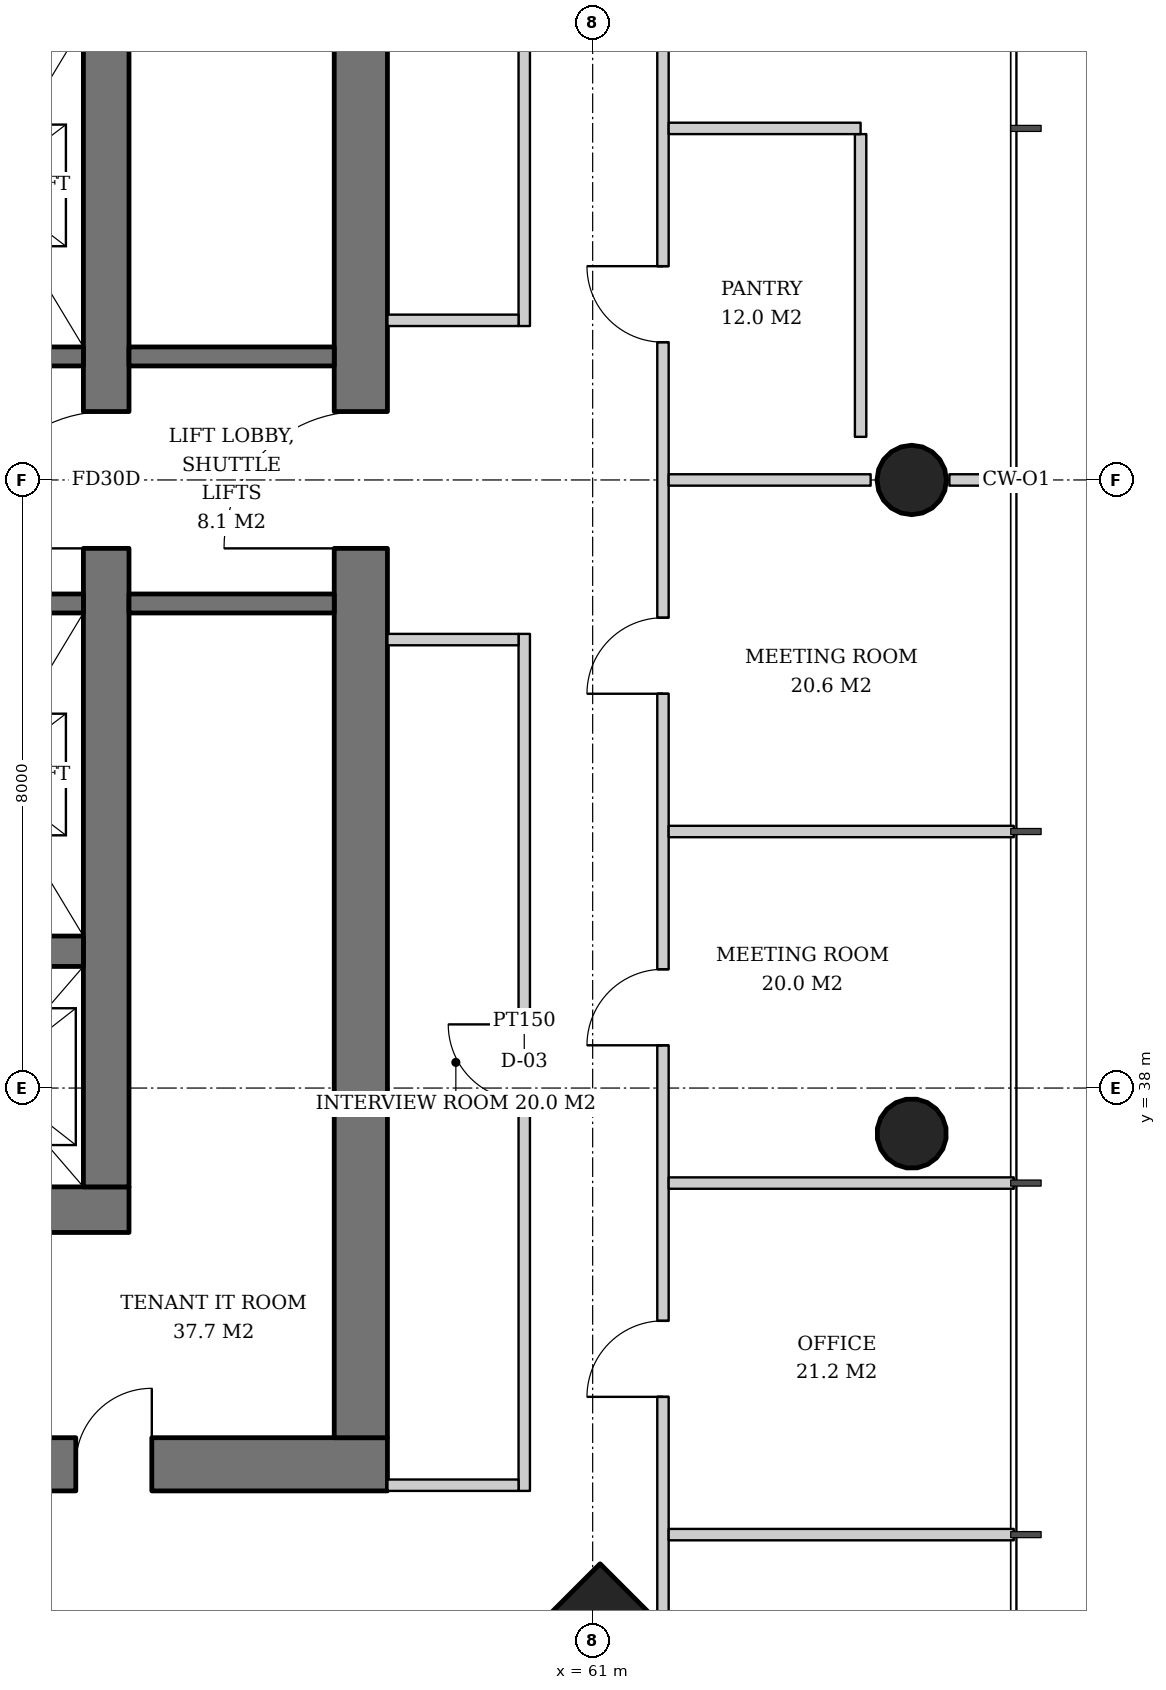
"""IFC4 building model, lengths in metres.
Left out: names, types, materials, properties, quantities, classifications, styles, units other than length and angle.
Written with IfcOpenShell. Run it as: python <this file> out.ifc"""

import sys

from ifc_helpers import new_model, si_unit, direction, frame, frame_2d, origin, origin_2d, place, context, subcontext, project, spatial, rectangle, hollow_circle, extrude, element, fill, save


model = new_model("IFC4")
c1 = context("Model", 3, precision=1e-05, world=origin(), true_north=direction((0.0, 1.0)))
c2 = subcontext(c1, "Body", "Model", "MODEL_VIEW")
j1 = project(units=[si_unit("LENGTHUNIT", "METRE"), si_unit("PLANEANGLEUNIT", "RADIAN")], contexts=[c1])
p1 = place(None, origin())
s1 = spatial("IfcSite", under=j1, at=p1, CompositionType="ELEMENT")
p2 = place(p1, origin())
s2 = spatial("IfcBuilding", under=s1, at=p2, CompositionType="ELEMENT")
p3 = place(p2, frame((0.0, 0.0, 138.8)))
s3 = spatial("IfcBuildingStorey", under=s2, at=p3, CompositionType="ELEMENT", Elevation=138.8)
p4 = place(p3, frame((65.236, 37.382, 0.0), z_axis=(-0.031910269556, 0.015987237665, 0.999362868496), x_axis=(-0.447933021895, -0.894067115991, 0.0)))
e1 = element("IfcColumn", 1, at=p4, inside=s3, PredefinedType="COLUMN", context=c2, shape_type="SweptSolid", body=[
    extrude(hollow_circle(Radius=0.457, WallThickness=0.03, at=origin_2d()), origin(), (0.0, 0.0, 1.0), 3.802),
])
p5 = place(p3, frame((65.236, 46.0, 0.0), z_axis=(-0.031914348339, 0.0, 0.999490607445), x_axis=(0.0, -1.0, 0.0)))
e2 = element("IfcColumn", 2, at=p5, inside=s3, PredefinedType="COLUMN", context=c2, shape_type="SweptSolid", body=[
    extrude(hollow_circle(Radius=0.457, WallThickness=0.03, at=origin_2d()), origin(), (0.0, 0.0, 1.0), 3.802),
])
p6 = place(p3, frame((61.136, 29.864, 0.0), z_axis=(-0.031898107953, 0.031898107953, 0.998981992539), x_axis=(-0.707106781187, -0.707106781187, 0.0)))
e3 = element("IfcColumn", 3, at=p6, inside=s3, PredefinedType="COLUMN", context=c2, shape_type="SweptSolid", body=[
    extrude(rectangle(XDim=2.6, YDim=2.6, at=origin_2d()), origin(), (0.0, 0.0, 1.0), 3.804),
])
p7 = place(p3, frame((35.1, 36.4, 0.0), z_axis=(0.0, 0.0, 1.0), x_axis=(1.0, 0.0, 0.0)))
e4 = element("IfcWall", 4, at=p7, inside=s3, PredefinedType="SHEAR", context=c2, shape_type="SweptSolid", body=[
    extrude(rectangle(XDim=19.8, YDim=0.6, at=frame_2d((9.9, 0.0))), origin(), (0.0, 0.0, 1.0), 3.8),
])
p8 = place(p7, frame((3.9, 0.0, 0.0)))
e5 = element("IfcOpeningElement", 5, at=p8, cuts=e4, PredefinedType="OPENING", context=c2, shape_type="SweptSolid", body=[
    extrude(rectangle(XDim=1.0, YDim=2.1, at=frame_2d((0.5, 1.05))), frame((0.0, 0.31, 0.0), z_axis=(0.0, -1.0, 0.0), x_axis=(1.0, 0.0, 0.0)), (0.0, 0.0, 1.0), 0.62),
])
p9 = place(p7, frame((15.35, 0.0, 0.0)))
e6 = element("IfcOpeningElement", 6, at=p9, cuts=e4, PredefinedType="OPENING", context=c2, shape_type="SweptSolid", body=[
    extrude(rectangle(XDim=1.0, YDim=2.1, at=frame_2d((0.5, 1.05))), frame((0.0, 0.31, 0.0), z_axis=(0.0, -1.0, 0.0), x_axis=(1.0, 0.0, 0.0)), (0.0, 0.0, 1.0), 0.62),
])
p10 = place(p3, frame((54.6, 36.7, 0.0), z_axis=(0.0, 0.0, 1.0), x_axis=(0.0, 1.0, 0.0)))
e7 = element("IfcWall", 7, at=p10, inside=s3, PredefinedType="SHEAR", context=c2, shape_type="SweptSolid", body=[
    extrude(rectangle(XDim=18.6, YDim=0.6, at=frame_2d((9.3, 0.0))), origin(), (0.0, 0.0, 1.0), 3.8),
])
p11 = place(p10, frame((8.4, 0.0, 0.0)))
e8 = element("IfcOpeningElement", 8, at=p11, cuts=e7, PredefinedType="OPENING", context=c2, shape_type="SweptSolid", body=[
    extrude(rectangle(XDim=1.8, YDim=2.4, at=frame_2d((0.9, 1.2))), frame((0.0, 0.31, 0.0), z_axis=(0.0, -1.0, 0.0), x_axis=(1.0, 0.0, 0.0)), (0.0, 0.0, 1.0), 0.62),
])
p12 = place(p3, frame((31.7, 33.05, 0.0), z_axis=(0.0, 0.0, 1.0), x_axis=(1.0, 0.0, 0.0)))
e9 = element("IfcWall", 9, at=p12, inside=s3, PredefinedType="SHEAR", context=c2, shape_type="SweptSolid", body=[
    extrude(rectangle(XDim=26.6, YDim=0.7, at=frame_2d((13.3, 0.0))), origin(), (0.0, 0.0, 1.0), 3.8),
])
p13 = place(p12, frame((7.3, 0.0, 0.0)))
e10 = element("IfcOpeningElement", 10, at=p13, cuts=e9, PredefinedType="OPENING", context=c2, shape_type="SweptSolid", body=[
    extrude(rectangle(XDim=1.0, YDim=2.1, at=frame_2d((0.5, 1.05))), frame((0.0, 0.36, 0.0), z_axis=(0.0, -1.0, 0.0), x_axis=(1.0, 0.0, 0.0)), (0.0, 0.0, 1.0), 0.72),
])
p14 = place(p12, frame((18.75, 0.0, 0.0)))
e11 = element("IfcOpeningElement", 11, at=p14, cuts=e9, PredefinedType="OPENING", context=c2, shape_type="SweptSolid", body=[
    extrude(rectangle(XDim=1.0, YDim=2.1, at=frame_2d((0.5, 1.05))), frame((0.0, 0.36, 0.0), z_axis=(0.0, -1.0, 0.0), x_axis=(1.0, 0.0, 0.0)), (0.0, 0.0, 1.0), 0.72),
])
p15 = place(p12, frame((3.2, 0.0, 0.0)))
e12 = element("IfcOpeningElement", 12, at=p15, cuts=e9, PredefinedType="OPENING", context=c2, shape_type="SweptSolid", body=[
    extrude(rectangle(XDim=1.0, YDim=2.1, at=frame_2d((0.5, 1.05))), frame((0.0, 0.36, 0.0), z_axis=(0.0, -1.0, 0.0), x_axis=(1.0, 0.0, 0.0)), (0.0, 0.0, 1.0), 0.72),
])
p16 = place(p12, frame((10.42, 0.0, 0.0)))
e13 = element("IfcOpeningElement", 13, at=p16, cuts=e9, PredefinedType="OPENING", context=c2, shape_type="SweptSolid", body=[
    extrude(rectangle(XDim=1.0, YDim=2.1, at=frame_2d((0.5, 1.05))), frame((0.0, 0.36, 0.0), z_axis=(0.0, -1.0, 0.0), x_axis=(1.0, 0.0, 0.0)), (0.0, 0.0, 1.0), 0.72),
])
p17 = place(p12, frame((14.46, 0.0, 0.0)))
e14 = element("IfcOpeningElement", 14, at=p17, cuts=e9, PredefinedType="OPENING", context=c2, shape_type="SweptSolid", body=[
    extrude(rectangle(XDim=1.0, YDim=2.1, at=frame_2d((0.5, 1.05))), frame((0.0, 0.36, 0.0), z_axis=(0.0, -1.0, 0.0), x_axis=(1.0, 0.0, 0.0)), (0.0, 0.0, 1.0), 0.72),
])
p18 = place(p12, frame((22.5, 0.0, 0.0)))
e15 = element("IfcOpeningElement", 15, at=p18, cuts=e9, PredefinedType="OPENING", context=c2, shape_type="SweptSolid", body=[
    extrude(rectangle(XDim=1.0, YDim=2.1, at=frame_2d((0.5, 1.05))), frame((0.0, 0.36, 0.0), z_axis=(0.0, -1.0, 0.0), x_axis=(1.0, 0.0, 0.0)), (0.0, 0.0, 1.0), 0.72),
])
p19 = place(p3, frame((57.95, 33.4, 0.0), z_axis=(0.0, 0.0, 1.0), x_axis=(0.0, 1.0, 0.0)))
e16 = element("IfcWall", 16, at=p19, inside=s3, PredefinedType="SHEAR", context=c2, shape_type="SweptSolid", body=[
    extrude(rectangle(XDim=25.2, YDim=0.7, at=frame_2d((12.6, 0.0))), origin(), (0.0, 0.0, 1.0), 3.8),
])
p20 = place(p19, frame((11.7, 0.0, 0.0)))
e17 = element("IfcOpeningElement", 17, at=p20, cuts=e16, PredefinedType="OPENING", context=c2, shape_type="SweptSolid", body=[
    extrude(rectangle(XDim=1.8, YDim=2.4, at=frame_2d((0.9, 1.2))), frame((0.0, 0.36, 0.0), z_axis=(0.0, -1.0, 0.0), x_axis=(1.0, 0.0, 0.0)), (0.0, 0.0, 1.0), 0.72),
])
p21 = place(p3, frame((35.7, 39.8, 0.0), z_axis=(0.0, 0.0, 1.0), x_axis=(1.0, 0.0, 0.0)))
e18 = element("IfcWall", 18, at=p21, inside=s3, PredefinedType="SHEAR", context=c2, shape_type="SweptSolid", body=[
    extrude(rectangle(XDim=18.6, YDim=0.4, at=frame_2d((9.3, 0.0))), origin(), (0.0, 0.0, 1.0), 3.8),
])
for number, where, z_axis, x_axis in (
    (19, (48.93, 47.625, 0.0), (0.0, 0.0, 1.0), (1.0, 0.0, 0.0)),
    (20, (48.93, 44.375, 0.0), (0.0, 0.0, 1.0), (1.0, 0.0, 0.0)),
):
    element("IfcWall", number, at=place(p3, frame(where, z_axis=z_axis, x_axis=x_axis)), inside=s3, PredefinedType="SHEAR", context=c2, shape_type="SweptSolid", body=[
        extrude(rectangle(XDim=5.37, YDim=0.25, at=frame_2d((2.685, 0.0))), origin(), (0.0, 0.0, 1.0), 3.8),
    ])
for number, where, z_axis, x_axis in (
    (21, (54.9, 44.375, 0.0), (0.0, 0.0, 1.0), (1.0, 0.0, 0.0)),
    (22, (54.9, 47.625, 0.0), (0.0, 0.0, 1.0), (1.0, 0.0, 0.0)),
):
    element("IfcWall", number, at=place(p3, frame(where, z_axis=z_axis, x_axis=x_axis)), inside=s3, PredefinedType="SOLIDWALL", context=c2, shape_type="SweptSolid", body=[
        extrude(rectangle(XDim=2.7, YDim=0.25, at=frame_2d((1.35, 0.0))), origin(), (0.0, 0.0, 1.0), 3.62),
    ])
p22 = place(p3, frame((60.1, 32.7, 0.0), z_axis=(0.0, 0.0, 1.0), x_axis=(0.0, 1.0, 0.0)))
e23 = element("IfcWall", 23, at=p22, inside=s3, PredefinedType="PARTITIONING", context=c2, shape_type="SweptSolid", body=[
    extrude(rectangle(XDim=11.275, YDim=0.15, at=frame_2d((5.638, 0.0))), origin(), (0.0, 0.0, 1.0), 2.72),
])
p23 = place(p22, frame((5.137, 0.0, 0.0)))
e24 = element("IfcOpeningElement", 24, at=p23, cuts=e23, PredefinedType="OPENING", context=c2, shape_type="SweptSolid", body=[
    extrude(rectangle(XDim=1.0, YDim=2.1, at=frame_2d((0.5, 1.05))), frame((0.0, 0.085, 0.0), z_axis=(0.0, -1.0, 0.0), x_axis=(1.0, 0.0, 0.0)), (0.0, 0.0, 1.0), 0.17),
])
for number, where, z_axis, x_axis in (
    (25, (58.3, 32.775, 0.0), (0.0, 0.0, 1.0), (1.0, 0.0, 0.0)),
    (26, (58.3, 43.9, 0.0), (0.0, 0.0, 1.0), (1.0, 0.0, 0.0)),
):
    element("IfcWall", number, at=place(p3, frame(where, z_axis=z_axis, x_axis=x_axis)), inside=s3, PredefinedType="PARTITIONING", context=c2, shape_type="SweptSolid", body=[
        extrude(rectangle(XDim=1.725, YDim=0.15, at=frame_2d((0.862, 0.0))), origin(), (0.0, 0.0, 1.0), 3.62),
    ])
p24 = place(p3, frame((60.1, 48.025, 0.0), z_axis=(0.0, 0.0, 1.0), x_axis=(0.0, 1.0, 0.0)))
e27 = element("IfcWall", 27, at=p24, inside=s3, PredefinedType="PARTITIONING", context=c2, shape_type="SweptSolid", body=[
    extrude(rectangle(XDim=11.275, YDim=0.15, at=frame_2d((5.638, 0.0))), origin(), (0.0, 0.0, 1.0), 2.806),
])
p25 = place(p24, frame((5.137, 0.0, 0.0)))
e28 = element("IfcOpeningElement", 28, at=p25, cuts=e27, PredefinedType="OPENING", context=c2, shape_type="SweptSolid", body=[
    extrude(rectangle(XDim=1.0, YDim=2.1, at=frame_2d((0.5, 1.05))), frame((0.0, 0.085, 0.0), z_axis=(0.0, -1.0, 0.0), x_axis=(1.0, 0.0, 0.0)), (0.0, 0.0, 1.0), 0.17),
])
p26 = place(p3, frame((58.3, 48.1, 0.0), z_axis=(0.0, 0.0, 1.0), x_axis=(1.0, 0.0, 0.0)))
e29 = element("IfcWall", 29, at=p26, inside=s3, PredefinedType="PARTITIONING", context=c2, shape_type="SweptSolid", body=[
    extrude(rectangle(XDim=1.725, YDim=0.15, at=frame_2d((0.862, 0.0))), origin(), (0.0, 0.0, 1.0), 3.62),
])
p27 = place(p3, frame((64.525, 46.567, 0.0), z_axis=(0.0, 0.0, 1.0), x_axis=(0.0, 1.0, 0.0)))
e30 = element("IfcWall", 30, at=p27, inside=s3, PredefinedType="PARTITIONING", context=c2, shape_type="SweptSolid", body=[
    extrude(rectangle(XDim=3.983, YDim=0.15, at=frame_2d((1.991, 0.0))), origin(), (0.0, 0.0, 1.0), 2.858),
])
p28 = place(p3, frame((61.925, 30.989, 0.0), z_axis=(0.0, 0.0, 1.0), x_axis=(0.0, 1.0, 0.0)))
e31 = element("IfcWall", 31, at=p28, inside=s3, PredefinedType="PARTITIONING", context=c2, shape_type="SweptSolid", body=[
    extrude(rectangle(XDim=30.023, YDim=0.15, at=frame_2d((15.011, 0.0))), origin(), (0.0, 0.0, 1.0), 2.72),
])
p29 = place(p28, frame((2.949, 0.0, 0.0)))
e32 = element("IfcOpeningElement", 32, at=p29, cuts=e31, PredefinedType="OPENING", context=c2, shape_type="SweptSolid", body=[
    extrude(rectangle(XDim=1.0, YDim=2.1, at=frame_2d((0.5, 1.05))), frame((0.0, 0.085, 0.0), z_axis=(0.0, -1.0, 0.0), x_axis=(1.0, 0.0, 0.0)), (0.0, 0.0, 1.0), 0.17),
])
p30 = place(p28, frame((7.574, 0.0, 0.0)))
e33 = element("IfcOpeningElement", 33, at=p30, cuts=e31, PredefinedType="OPENING", context=c2, shape_type="SweptSolid", body=[
    extrude(rectangle(XDim=1.0, YDim=2.1, at=frame_2d((0.5, 1.05))), frame((0.0, 0.085, 0.0), z_axis=(0.0, -1.0, 0.0), x_axis=(1.0, 0.0, 0.0)), (0.0, 0.0, 1.0), 0.17),
])
p31 = place(p28, frame((12.199, 0.0, 0.0)))
e34 = element("IfcOpeningElement", 34, at=p31, cuts=e31, PredefinedType="OPENING", context=c2, shape_type="SweptSolid", body=[
    extrude(rectangle(XDim=1.0, YDim=2.1, at=frame_2d((0.5, 1.05))), frame((0.0, 0.085, 0.0), z_axis=(0.0, -1.0, 0.0), x_axis=(1.0, 0.0, 0.0)), (0.0, 0.0, 1.0), 0.17),
])
p32 = place(p28, frame((16.824, 0.0, 0.0)))
e35 = element("IfcOpeningElement", 35, at=p32, cuts=e31, PredefinedType="OPENING", context=c2, shape_type="SweptSolid", body=[
    extrude(rectangle(XDim=1.0, YDim=2.1, at=frame_2d((0.5, 1.05))), frame((0.0, 0.085, 0.0), z_axis=(0.0, -1.0, 0.0), x_axis=(1.0, 0.0, 0.0)), (0.0, 0.0, 1.0), 0.17),
])
p33 = place(p28, frame((21.449, 0.0, 0.0)))
e36 = element("IfcOpeningElement", 36, at=p33, cuts=e31, PredefinedType="OPENING", context=c2, shape_type="SweptSolid", body=[
    extrude(rectangle(XDim=1.0, YDim=2.1, at=frame_2d((0.5, 1.05))), frame((0.0, 0.085, 0.0), z_axis=(0.0, -1.0, 0.0), x_axis=(1.0, 0.0, 0.0)), (0.0, 0.0, 1.0), 0.17),
])
p34 = place(p28, frame((26.074, 0.0, 0.0)))
e37 = element("IfcOpeningElement", 37, at=p34, cuts=e31, PredefinedType="OPENING", context=c2, shape_type="SweptSolid", body=[
    extrude(rectangle(XDim=1.0, YDim=2.1, at=frame_2d((0.5, 1.05))), frame((0.0, 0.085, 0.0), z_axis=(0.0, -1.0, 0.0), x_axis=(1.0, 0.0, 0.0)), (0.0, 0.0, 1.0), 0.17),
])
for number, where, z_axis, x_axis in (
    (38, (62.0, 32.125, 0.0), (0.0, 0.0, 1.0), (1.0, 0.0, 0.0)),
    (39, (62.0, 36.75, 0.0), (0.0, 0.0, 1.0), (1.0, 0.0, 0.0)),
    (40, (62.0, 41.375, 0.0), (0.0, 0.0, 1.0), (1.0, 0.0, 0.0)),
):
    element("IfcWall", number, at=place(p3, frame(where, z_axis=z_axis, x_axis=x_axis)), inside=s3, PredefinedType="PARTITIONING", context=c2, shape_type="SweptSolid", body=[
        extrude(rectangle(XDim=4.54, YDim=0.15, at=frame_2d((2.27, 0.0))), origin(), (0.0, 0.0, 1.0), 2.82),
    ])
p35 = place(p3, frame((62.0, 46.0, 0.0), z_axis=(0.0, 0.0, 1.0), x_axis=(1.0, 0.0, 0.0)))
e41 = element("IfcWall", 41, at=p35, inside=s3, PredefinedType="PARTITIONING", context=c2, shape_type="SweptSolid", body=[
    extrude(rectangle(XDim=2.657, YDim=0.15, at=frame_2d((1.329, 0.0))), origin(), (0.0, 0.0, 1.0), 3.62),
])
p36 = place(p3, frame((65.693, 46.0, 0.0), z_axis=(0.0, 0.0, 1.0), x_axis=(1.0, 0.0, 0.0)))
e42 = element("IfcWall", 42, at=p36, inside=s3, PredefinedType="PARTITIONING", context=c2, shape_type="SweptSolid", body=[
    extrude(rectangle(XDim=0.847, YDim=0.15, at=frame_2d((0.424, 0.0))), origin(), (0.0, 0.0, 1.0), 3.62),
])
p37 = place(p3, frame((62.0, 50.625, 0.0), z_axis=(0.0, 0.0, 1.0), x_axis=(1.0, 0.0, 0.0)))
e43 = element("IfcWall", 43, at=p37, inside=s3, PredefinedType="PARTITIONING", context=c2, shape_type="SweptSolid", body=[
    extrude(rectangle(XDim=2.525, YDim=0.15, at=frame_2d((1.262, 0.0))), origin(), (0.0, 0.0, 1.0), 3.62),
])
p38 = place(p11, origin())
e44 = element("IfcDoor", 44, at=p38, inside=s3, OperationType="DOUBLE_DOOR_SINGLE_SWING", PredefinedType="DOOR", context=c2, shape_type="SweptSolid", body=[
    extrude(rectangle(XDim=1.8, YDim=2.4, at=frame_2d((0.9, 1.2))), frame((0.0, 0.025, 0.0), z_axis=(0.0, -1.0, 0.0), x_axis=(1.0, 0.0, 0.0)), (0.0, 0.0, 1.0), 0.05),
])
fill(e8, e44)
p39 = place(p20, origin())
e45 = element("IfcDoor", 45, at=p39, inside=s3, OperationType="DOUBLE_DOOR_SINGLE_SWING", PredefinedType="DOOR", context=c2, shape_type="SweptSolid", body=[
    extrude(rectangle(XDim=1.8, YDim=2.4, at=frame_2d((0.9, 1.2))), frame((0.0, 0.025, 0.0), z_axis=(0.0, -1.0, 0.0), x_axis=(1.0, 0.0, 0.0)), (0.0, 0.0, 1.0), 0.05),
])
fill(e17, e45)
p40 = place(p18, origin())
e46 = element("IfcDoor", 46, at=p40, inside=s3, OperationType="SINGLE_SWING_RIGHT", PredefinedType="DOOR", context=c2, shape_type="SweptSolid", body=[
    extrude(rectangle(XDim=1.0, YDim=2.1, at=frame_2d((0.5, 1.05))), frame((0.0, 0.34, 0.0), z_axis=(0.0, -1.0, 0.0), x_axis=(1.0, 0.0, 0.0)), (0.0, 0.0, 1.0), 0.05),
])
fill(e15, e46)
p41 = place(p23, origin())
e47 = element("IfcDoor", 47, at=p41, inside=s3, OperationType="SINGLE_SWING_RIGHT", PredefinedType="DOOR", context=c2, shape_type="SweptSolid", body=[
    extrude(rectangle(XDim=1.0, YDim=2.1, at=frame_2d((0.5, 1.05))), frame((0.0, 0.025, 0.0), z_axis=(0.0, -1.0, 0.0), x_axis=(1.0, 0.0, 0.0)), (0.0, 0.0, 1.0), 0.05),
])
fill(e24, e47)
p42 = place(p29, origin())
e48 = element("IfcDoor", 48, at=p42, inside=s3, OperationType="SINGLE_SWING_LEFT", PredefinedType="DOOR", context=c2, shape_type="SweptSolid", body=[
    extrude(rectangle(XDim=1.0, YDim=2.1, at=frame_2d((0.5, 1.05))), frame((0.0, 0.025, 0.0), z_axis=(0.0, -1.0, 0.0), x_axis=(1.0, 0.0, 0.0)), (0.0, 0.0, 1.0), 0.05),
])
fill(e32, e48)
p43 = place(p30, origin())
e49 = element("IfcDoor", 49, at=p43, inside=s3, OperationType="SINGLE_SWING_LEFT", PredefinedType="DOOR", context=c2, shape_type="SweptSolid", body=[
    extrude(rectangle(XDim=1.0, YDim=2.1, at=frame_2d((0.5, 1.05))), frame((0.0, 0.025, 0.0), z_axis=(0.0, -1.0, 0.0), x_axis=(1.0, 0.0, 0.0)), (0.0, 0.0, 1.0), 0.05),
])
fill(e33, e49)
p44 = place(p31, origin())
e50 = element("IfcDoor", 50, at=p44, inside=s3, OperationType="SINGLE_SWING_LEFT", PredefinedType="DOOR", context=c2, shape_type="SweptSolid", body=[
    extrude(rectangle(XDim=1.0, YDim=2.1, at=frame_2d((0.5, 1.05))), frame((0.0, 0.025, 0.0), z_axis=(0.0, -1.0, 0.0), x_axis=(1.0, 0.0, 0.0)), (0.0, 0.0, 1.0), 0.05),
])
fill(e34, e50)
p45 = place(p32, origin())
e51 = element("IfcDoor", 51, at=p45, inside=s3, OperationType="SINGLE_SWING_RIGHT", PredefinedType="DOOR", context=c2, shape_type="SweptSolid", body=[
    extrude(rectangle(XDim=1.0, YDim=2.1, at=frame_2d((0.5, 1.05))), frame((0.0, 0.025, 0.0), z_axis=(0.0, -1.0, 0.0), x_axis=(1.0, 0.0, 0.0)), (0.0, 0.0, 1.0), 0.05),
])
fill(e35, e51)
save(model, sys.argv[1])
